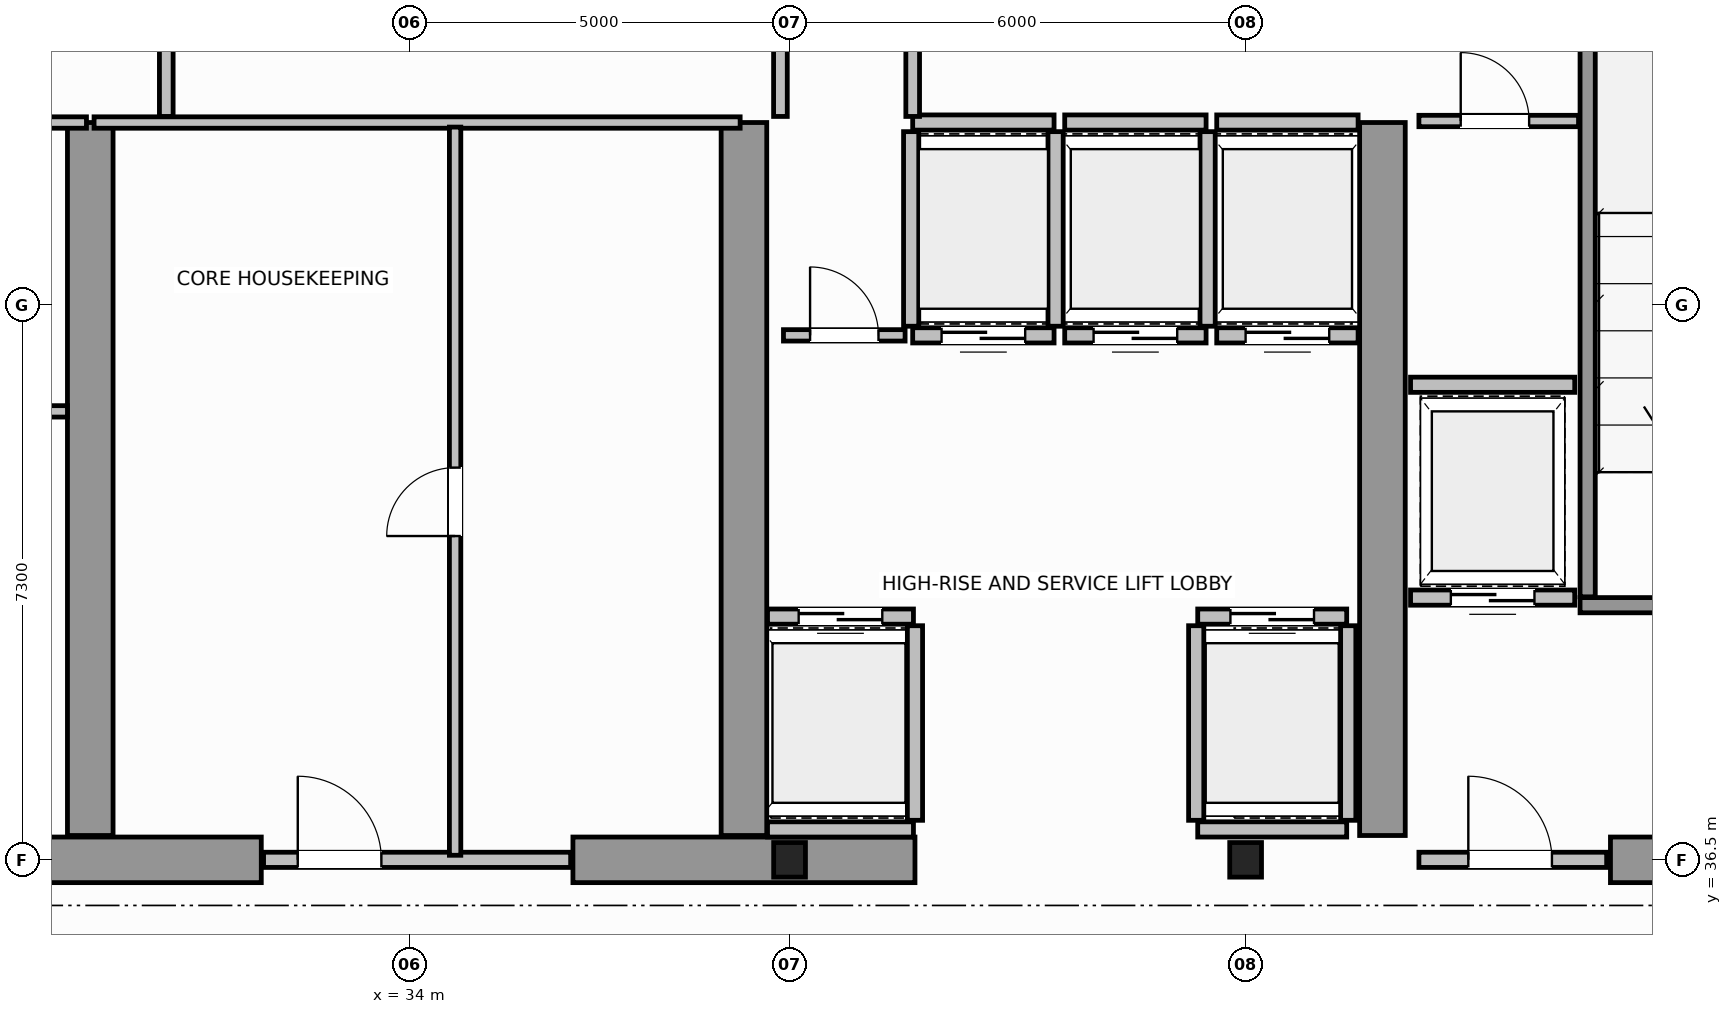
"""IFC4 building model, lengths in metres.
Left out: names, types, materials, properties, quantities, classifications, styles, units other than length and angle.
Written with IfcOpenShell. Run it as: python <this file> out.ifc"""

import sys

from ifc_helpers import new_model, si_unit, direction, frame, frame_2d, origin, origin_2d, place, context, subcontext, project, spatial, rectangle, i_section, extrude, source, transform, mapped, element, fill, save


model = new_model("IFC4")
c1 = context("Model", 3, precision=1e-05, world=origin(), true_north=direction((0.0, 1.0)))
c2 = subcontext(c1, "Body", "Model", "MODEL_VIEW")
j1 = project(units=[si_unit("LENGTHUNIT", "METRE"), si_unit("PLANEANGLEUNIT", "RADIAN")], contexts=[c1])
p1 = place(None, origin())
s1 = spatial("IfcSite", under=j1, at=p1, CompositionType="ELEMENT")
p2 = place(p1, origin())
s2 = spatial("IfcBuilding", under=s1, at=p2, CompositionType="ELEMENT")
p3 = place(p2, frame((0.0, 0.0, 214.6)))
s3 = spatial("IfcBuildingStorey", under=s2, at=p3, CompositionType="ELEMENT", Elevation=214.6)
m1 = source(origin(), c2, "Body", "SweptSolid", [
    extrude(i_section(OverallWidth=0.418, OverallDepth=0.455, WebThickness=0.042, FlangeThickness=0.058, FilletRadius=0.015, at=origin_2d()), origin(), (0.0, 0.0, 1.0), 3.8),
])
for number, where, z_axis, x_axis in (
    (1, (39.0, 36.5, 0.0), (0.0, 0.0, 1.0), (1.0, 0.0, 0.0)),
    (2, (45.0, 36.5, 0.0), (0.0, 0.0, 1.0), (1.0, 0.0, 0.0)),
):
    element("IfcColumn", number, at=place(p3, frame(where, z_axis=z_axis, x_axis=x_axis)), inside=s3, PredefinedType="COLUMN", context=c2, shape_type="MappedRepresentation", body=[
        mapped(m1, transform((0.0, 0.0, 0.0), scale=1.0)),
    ])
for number, where, z_axis, x_axis in (
    (3, (27.55, 36.5, 0.0), (0.0, 0.0, 1.0), (1.0, 0.0, 0.0)),
    (4, (36.15, 36.5, 0.0), (0.0, 0.0, 1.0), (1.0, 0.0, 0.0)),
):
    element("IfcWall", number, at=place(p3, frame(where, z_axis=z_axis, x_axis=x_axis)), inside=s3, PredefinedType="SHEAR", context=c2, shape_type="SweptSolid", body=[
        extrude(rectangle(XDim=4.5, YDim=0.6, at=frame_2d((2.25, 0.0))), origin(), (0.0, 0.0, 1.0), 3.8),
    ])
p4 = place(p3, frame((49.8, 36.5, 0.0), z_axis=(0.0, 0.0, 1.0), x_axis=(1.0, 0.0, 0.0)))
e5 = element("IfcWall", 5, at=p4, inside=s3, PredefinedType="SHEAR", context=c2, shape_type="SweptSolid", body=[
    extrude(rectangle(XDim=3.88, YDim=0.6, at=frame_2d((1.94, 0.0))), origin(), (0.0, 0.0, 1.0), 2.54),
])
for number, where, z_axis, x_axis in (
    (6, (29.8, 36.82, 0.0), (0.0, 0.0, 1.0), (0.0, 1.0, 0.0)),
    (7, (38.4, 36.82, 0.0), (0.0, 0.0, 1.0), (0.0, 1.0, 0.0)),
    (8, (46.8, 36.82, 0.0), (0.0, 0.0, 1.0), (0.0, 1.0, 0.0)),
):
    element("IfcWall", number, at=place(p3, frame(where, z_axis=z_axis, x_axis=x_axis)), inside=s3, PredefinedType="SHEAR", context=c2, shape_type="SweptSolid", body=[
        extrude(rectangle(XDim=9.38, YDim=0.6, at=frame_2d((4.69, 0.0))), origin(), (0.0, 0.0, 1.0), 3.8),
    ])
p5 = place(p3, frame((49.4, 39.85, 0.0), z_axis=(0.0, 0.0, 1.0), x_axis=(1.0, 0.0, 0.0)))
e9 = element("IfcWall", 9, at=p5, inside=s3, PredefinedType="SOLIDWALL", context=c2, shape_type="SweptSolid", body=[
    extrude(rectangle(XDim=4.3, YDim=0.2, at=frame_2d((2.15, 0.0))), origin(), (0.0, 0.0, 1.0), 3.8),
])
p6 = place(p5, frame((1.325, 0.0, 0.0)))
e10 = element("IfcOpeningElement", 10, at=p6, cuts=e9, PredefinedType="OPENING", context=c2, shape_type="SweptSolid", body=[
    extrude(rectangle(XDim=1.1, YDim=2.15, at=frame_2d((0.55, 1.075))), frame((0.0, 0.11, 0.0), z_axis=(0.0, -1.0, 0.0), x_axis=(1.0, 0.0, 0.0)), (0.0, 0.0, 1.0), 0.22),
])
p7 = place(p3, frame((49.5, 39.96, 0.0), z_axis=(0.0, 0.0, 1.0), x_axis=(0.0, 1.0, 0.0)))
e11 = element("IfcWall", 11, at=p7, inside=s3, PredefinedType="SOLIDWALL", context=c2, shape_type="SweptSolid", body=[
    extrude(rectangle(XDim=9.93, YDim=0.2, at=frame_2d((4.965, 0.0))), origin(), (0.0, 0.0, 1.0), 3.8),
])
p8 = place(p3, frame((47.28, 36.5, 0.0), z_axis=(0.0, 0.0, 1.0), x_axis=(1.0, 0.0, 0.0)))
e12 = element("IfcWall", 12, at=p8, inside=s3, PredefinedType="SOLIDWALL", context=c2, shape_type="SweptSolid", body=[
    extrude(rectangle(XDim=2.47, YDim=0.2, at=frame_2d((1.235, 0.0))), origin(), (0.0, 0.0, 1.0), 2.53),
])
p9 = place(p8, frame((0.65, 0.0, 0.0)))
e13 = element("IfcOpeningElement", 13, at=p9, cuts=e12, PredefinedType="OPENING", context=c2, shape_type="SweptSolid", body=[
    extrude(rectangle(XDim=1.1, YDim=2.15, at=frame_2d((0.55, 1.075))), frame((0.0, 0.11, 0.0), z_axis=(0.0, -1.0, 0.0), x_axis=(1.0, 0.0, 0.0)), (0.0, 0.0, 1.0), 0.22),
])
p10 = place(p3, frame((38.71, 39.7, 0.0), z_axis=(0.0, 0.0, 1.0), x_axis=(1.0, 0.0, 0.0)))
e14 = element("IfcWall", 14, at=p10, inside=s3, PredefinedType="SOLIDWALL", context=c2, shape_type="SweptSolid", body=[
    extrude(rectangle(XDim=1.92, YDim=0.2, at=frame_2d((0.96, 0.0))), origin(), (0.0, 0.0, 1.0), 3.54),
])
p11 = place(p10, frame((0.41, 0.0, 0.0)))
e15 = element("IfcOpeningElement", 15, at=p11, cuts=e14, PredefinedType="OPENING", context=c2, shape_type="SweptSolid", body=[
    extrude(rectangle(XDim=1.1, YDim=2.15, at=frame_2d((0.55, 1.075))), frame((0.0, 0.11, 0.0), z_axis=(0.0, -1.0, 0.0), x_axis=(1.0, 0.0, 0.0)), (0.0, 0.0, 1.0), 0.22),
])
p12 = place(p3, frame((38.71, 36.9, 0.0), z_axis=(0.0, 0.0, 1.0), x_axis=(1.0, 0.0, 0.0)))
e16 = element("IfcWall", 16, at=p12, inside=s3, PredefinedType="SOLIDWALL", context=c2, shape_type="SweptSolid", body=[
    extrude(rectangle(XDim=1.92, YDim=0.2, at=frame_2d((0.96, 0.0))), origin(), (0.0, 0.0, 1.0), 3.54),
])
p13 = place(p3, frame((40.65, 37.02, 0.0), z_axis=(0.0, 0.0, 1.0), x_axis=(0.0, 1.0, 0.0)))
e17 = element("IfcWall", 17, at=p13, inside=s3, PredefinedType="SOLIDWALL", context=c2, shape_type="SweptSolid", body=[
    extrude(rectangle(XDim=2.56, YDim=0.2, at=frame_2d((1.28, 0.0))), origin(), (0.0, 0.0, 1.0), 3.54),
])
p14 = place(p3, frame((44.37, 39.7, 0.0), z_axis=(0.0, 0.0, 1.0), x_axis=(1.0, 0.0, 0.0)))
e18 = element("IfcWall", 18, at=p14, inside=s3, PredefinedType="SOLIDWALL", context=c2, shape_type="SweptSolid", body=[
    extrude(rectangle(XDim=1.96, YDim=0.2, at=frame_2d((0.98, 0.0))), origin(), (0.0, 0.0, 1.0), 3.54),
])
p15 = place(p14, frame((0.43, 0.0, 0.0)))
e19 = element("IfcOpeningElement", 19, at=p15, cuts=e18, PredefinedType="OPENING", context=c2, shape_type="SweptSolid", body=[
    extrude(rectangle(XDim=1.1, YDim=2.15, at=frame_2d((0.55, 1.075))), frame((0.0, 0.11, 0.0), z_axis=(0.0, -1.0, 0.0), x_axis=(1.0, 0.0, 0.0)), (0.0, 0.0, 1.0), 0.22),
])
p16 = place(p3, frame((44.37, 36.9, 0.0), z_axis=(0.0, 0.0, 1.0), x_axis=(1.0, 0.0, 0.0)))
e20 = element("IfcWall", 20, at=p16, inside=s3, PredefinedType="SOLIDWALL", context=c2, shape_type="SweptSolid", body=[
    extrude(rectangle(XDim=1.96, YDim=0.2, at=frame_2d((0.98, 0.0))), origin(), (0.0, 0.0, 1.0), 2.53),
])
for number, where, z_axis, x_axis in (
    (21, (44.35, 37.02, 0.0), (0.0, 0.0, 1.0), (0.0, 1.0, 0.0)),
    (22, (46.35, 37.02, 0.0), (0.0, 0.0, 1.0), (0.0, 1.0, 0.0)),
):
    element("IfcWall", number, at=place(p3, frame(where, z_axis=z_axis, x_axis=x_axis)), inside=s3, PredefinedType="SOLIDWALL", context=c2, shape_type="SweptSolid", body=[
        extrude(rectangle(XDim=2.56, YDim=0.2, at=frame_2d((1.28, 0.0))), origin(), (0.0, 0.0, 1.0), 3.54),
    ])
p17 = place(p3, frame((40.62, 43.4, 0.0), z_axis=(0.0, 0.0, 1.0), x_axis=(1.0, 0.0, 0.0)))
e23 = element("IfcWall", 23, at=p17, inside=s3, PredefinedType="SOLIDWALL", context=c2, shape_type="SweptSolid", body=[
    extrude(rectangle(XDim=1.86, YDim=0.2, at=frame_2d((0.93, 0.0))), origin(), (0.0, 0.0, 1.0), 3.54),
])
p18 = place(p17, frame((0.38, 0.0, 0.0)))
e24 = element("IfcOpeningElement", 24, at=p18, cuts=e23, PredefinedType="OPENING", context=c2, shape_type="SweptSolid", body=[
    extrude(rectangle(XDim=1.1, YDim=2.15, at=frame_2d((0.55, 1.075))), frame((0.0, 0.11, 0.0), z_axis=(0.0, -1.0, 0.0), x_axis=(1.0, 0.0, 0.0)), (0.0, 0.0, 1.0), 0.22),
])
p19 = place(p3, frame((40.62, 46.2, 0.0), z_axis=(0.0, 0.0, 1.0), x_axis=(1.0, 0.0, 0.0)))
e25 = element("IfcWall", 25, at=p19, inside=s3, PredefinedType="SOLIDWALL", context=c2, shape_type="SweptSolid", body=[
    extrude(rectangle(XDim=1.86, YDim=0.2, at=frame_2d((0.93, 0.0))), origin(), (0.0, 0.0, 1.0), 3.54),
])
for number, where, z_axis, x_axis in (
    (26, (40.6, 43.52, 0.0), (0.0, 0.0, 1.0), (0.0, 1.0, 0.0)),
    (27, (42.5, 43.52, 0.0), (0.0, 0.0, 1.0), (0.0, 1.0, 0.0)),
):
    element("IfcWall", number, at=place(p3, frame(where, z_axis=z_axis, x_axis=x_axis)), inside=s3, PredefinedType="SOLIDWALL", context=c2, shape_type="SweptSolid", body=[
        extrude(rectangle(XDim=2.56, YDim=0.2, at=frame_2d((1.28, 0.0))), origin(), (0.0, 0.0, 1.0), 3.54),
    ])
p20 = place(p3, frame((42.62, 43.4, 0.0), z_axis=(0.0, 0.0, 1.0), x_axis=(1.0, 0.0, 0.0)))
e28 = element("IfcWall", 28, at=p20, inside=s3, PredefinedType="SOLIDWALL", context=c2, shape_type="SweptSolid", body=[
    extrude(rectangle(XDim=1.86, YDim=0.2, at=frame_2d((0.93, 0.0))), origin(), (0.0, 0.0, 1.0), 3.54),
])
p21 = place(p20, frame((0.38, 0.0, 0.0)))
e29 = element("IfcOpeningElement", 29, at=p21, cuts=e28, PredefinedType="OPENING", context=c2, shape_type="SweptSolid", body=[
    extrude(rectangle(XDim=1.1, YDim=2.15, at=frame_2d((0.55, 1.075))), frame((0.0, 0.11, 0.0), z_axis=(0.0, -1.0, 0.0), x_axis=(1.0, 0.0, 0.0)), (0.0, 0.0, 1.0), 0.22),
])
p22 = place(p3, frame((42.62, 46.2, 0.0), z_axis=(0.0, 0.0, 1.0), x_axis=(1.0, 0.0, 0.0)))
e30 = element("IfcWall", 30, at=p22, inside=s3, PredefinedType="SOLIDWALL", context=c2, shape_type="SweptSolid", body=[
    extrude(rectangle(XDim=1.86, YDim=0.2, at=frame_2d((0.93, 0.0))), origin(), (0.0, 0.0, 1.0), 3.54),
])
p23 = place(p3, frame((44.5, 43.52, 0.0), z_axis=(0.0, 0.0, 1.0), x_axis=(0.0, 1.0, 0.0)))
e31 = element("IfcWall", 31, at=p23, inside=s3, PredefinedType="SOLIDWALL", context=c2, shape_type="SweptSolid", body=[
    extrude(rectangle(XDim=2.56, YDim=0.2, at=frame_2d((1.28, 0.0))), origin(), (0.0, 0.0, 1.0), 3.54),
])
p24 = place(p3, frame((44.62, 43.4, 0.0), z_axis=(0.0, 0.0, 1.0), x_axis=(1.0, 0.0, 0.0)))
e32 = element("IfcWall", 32, at=p24, inside=s3, PredefinedType="SOLIDWALL", context=c2, shape_type="SweptSolid", body=[
    extrude(rectangle(XDim=1.86, YDim=0.2, at=frame_2d((0.93, 0.0))), origin(), (0.0, 0.0, 1.0), 3.54),
])
p25 = place(p24, frame((0.38, 0.0, 0.0)))
e33 = element("IfcOpeningElement", 33, at=p25, cuts=e32, PredefinedType="OPENING", context=c2, shape_type="SweptSolid", body=[
    extrude(rectangle(XDim=1.1, YDim=2.15, at=frame_2d((0.55, 1.075))), frame((0.0, 0.11, 0.0), z_axis=(0.0, -1.0, 0.0), x_axis=(1.0, 0.0, 0.0)), (0.0, 0.0, 1.0), 0.22),
])
p26 = place(p3, frame((44.62, 46.2, 0.0), z_axis=(0.0, 0.0, 1.0), x_axis=(1.0, 0.0, 0.0)))
e34 = element("IfcWall", 34, at=p26, inside=s3, PredefinedType="SOLIDWALL", context=c2, shape_type="SweptSolid", body=[
    extrude(rectangle(XDim=1.86, YDim=0.2, at=frame_2d((0.93, 0.0))), origin(), (0.0, 0.0, 1.0), 3.54),
])
p27 = place(p3, frame((47.17, 39.95, 0.0), z_axis=(0.0, 0.0, 1.0), x_axis=(1.0, 0.0, 0.0)))
e35 = element("IfcWall", 35, at=p27, inside=s3, PredefinedType="SOLIDWALL", context=c2, shape_type="SweptSolid", body=[
    extrude(rectangle(XDim=2.16, YDim=0.2, at=frame_2d((1.08, 0.0))), origin(), (0.0, 0.0, 1.0), 3.54),
])
p28 = place(p27, frame((0.53, 0.0, 0.0)))
e36 = element("IfcOpeningElement", 36, at=p28, cuts=e35, PredefinedType="OPENING", context=c2, shape_type="SweptSolid", body=[
    extrude(rectangle(XDim=1.1, YDim=2.15, at=frame_2d((0.55, 1.075))), frame((0.0, 0.11, 0.0), z_axis=(0.0, -1.0, 0.0), x_axis=(1.0, 0.0, 0.0)), (0.0, 0.0, 1.0), 0.22),
])
p29 = place(p3, frame((47.17, 42.75, 0.0), z_axis=(0.0, 0.0, 1.0), x_axis=(1.0, 0.0, 0.0)))
e37 = element("IfcWall", 37, at=p29, inside=s3, PredefinedType="SOLIDWALL", context=c2, shape_type="SweptSolid", body=[
    extrude(rectangle(XDim=2.16, YDim=0.2, at=frame_2d((1.08, 0.0))), origin(), (0.0, 0.0, 1.0), 3.54),
])
p30 = place(p3, frame((21.25, 46.2, 0.0), z_axis=(0.0, 0.0, 1.0), x_axis=(1.0, 0.0, 0.0)))
e38 = element("IfcWall", 38, at=p30, inside=s3, PredefinedType="PARTITIONING", context=c2, shape_type="SweptSolid", body=[
    extrude(rectangle(XDim=8.5, YDim=0.15, at=frame_2d((4.25, 0.0))), origin(), (0.0, 0.0, 1.0), 3.54),
])
p31 = place(p3, frame((21.5, 42.4, 0.0), z_axis=(0.0, 0.0, 1.0), x_axis=(1.0, 0.0, 0.0)))
e39 = element("IfcWall", 39, at=p31, inside=s3, PredefinedType="PARTITIONING", context=c2, shape_type="SweptSolid", body=[
    extrude(rectangle(XDim=8.0, YDim=0.15, at=frame_2d((4.0, 0.0))), origin(), (0.0, 0.0, 1.0), 3.54),
])
p32 = place(p31, frame((3.4, 0.0, 0.0)))
e40 = element("IfcOpeningElement", 40, at=p32, cuts=e39, PredefinedType="OPENING", context=c2, shape_type="SweptSolid", body=[
    extrude(rectangle(XDim=0.9, YDim=2.1, at=frame_2d((0.45, 1.05))), frame((0.0, 0.085, 0.0), z_axis=(0.0, -1.0, 0.0), x_axis=(1.0, 0.0, 0.0)), (0.0, 0.0, 1.0), 0.17),
])
p33 = place(p3, frame((32.08, 36.5, 0.0), z_axis=(0.0, 0.0, 1.0), x_axis=(1.0, 0.0, 0.0)))
e41 = element("IfcWall", 41, at=p33, inside=s3, PredefinedType="SOLIDWALL", context=c2, shape_type="SweptSolid", body=[
    extrude(rectangle(XDim=4.04, YDim=0.2, at=frame_2d((2.02, 0.0))), origin(), (0.0, 0.0, 1.0), 2.93),
])
p34 = place(p33, frame((0.45, 0.0, 0.0)))
e42 = element("IfcOpeningElement", 42, at=p34, cuts=e41, PredefinedType="OPENING", context=c2, shape_type="SweptSolid", body=[
    extrude(rectangle(XDim=1.1, YDim=2.15, at=frame_2d((0.55, 1.075))), frame((0.0, 0.11, 0.0), z_axis=(0.0, -1.0, 0.0), x_axis=(1.0, 0.0, 0.0)), (0.0, 0.0, 1.0), 0.22),
])
p35 = place(p3, frame((29.85, 46.2, 0.0), z_axis=(0.0, 0.0, 1.0), x_axis=(1.0, 0.0, 0.0)))
e43 = element("IfcWall", 43, at=p35, inside=s3, PredefinedType="PARTITIONING", context=c2, shape_type="SweptSolid", body=[
    extrude(rectangle(XDim=8.5, YDim=0.15, at=frame_2d((4.25, 0.0))), origin(), (0.0, 0.0, 1.0), 3.54),
])
p36 = place(p3, frame((34.6, 36.56, 0.0), z_axis=(0.0, 0.0, 1.0), x_axis=(0.0, 1.0, 0.0)))
e44 = element("IfcWall", 44, at=p36, inside=s3, PredefinedType="PARTITIONING", context=c2, shape_type="SweptSolid", body=[
    extrude(rectangle(XDim=9.58, YDim=0.15, at=frame_2d((4.79, 0.0))), origin(), (0.0, 0.0, 1.0), 3.54),
])
p37 = place(p36, frame((4.2, 0.0, 0.0)))
e45 = element("IfcOpeningElement", 45, at=p37, cuts=e44, PredefinedType="OPENING", context=c2, shape_type="SweptSolid", body=[
    extrude(rectangle(XDim=0.9, YDim=2.1, at=frame_2d((0.45, 1.05))), frame((0.0, 0.085, 0.0), z_axis=(0.0, -1.0, 0.0), x_axis=(1.0, 0.0, 0.0)), (0.0, 0.0, 1.0), 0.17),
])
p38 = place(p3, frame((47.28, 46.22, 0.0), z_axis=(0.0, 0.0, 1.0), x_axis=(1.0, 0.0, 0.0)))
e46 = element("IfcWall", 46, at=p38, inside=s3, PredefinedType="PARTITIONING", context=c2, shape_type="SweptSolid", body=[
    extrude(rectangle(XDim=2.1, YDim=0.15, at=frame_2d((1.05, 0.0))), origin(), (0.0, 0.0, 1.0), 3.54),
])
p39 = place(p38, frame((0.55, 0.0, 0.0)))
e47 = element("IfcOpeningElement", 47, at=p39, cuts=e46, PredefinedType="OPENING", context=c2, shape_type="SweptSolid", body=[
    extrude(rectangle(XDim=0.9, YDim=2.1, at=frame_2d((0.45, 1.05))), frame((0.0, 0.085, 0.0), z_axis=(0.0, -1.0, 0.0), x_axis=(1.0, 0.0, 0.0)), (0.0, 0.0, 1.0), 0.17),
])
p40 = place(p3, frame((38.92, 43.4, 0.0), z_axis=(0.0, 0.0, 1.0), x_axis=(1.0, 0.0, 0.0)))
e48 = element("IfcWall", 48, at=p40, inside=s3, PredefinedType="PARTITIONING", context=c2, shape_type="SweptSolid", body=[
    extrude(rectangle(XDim=1.6, YDim=0.15, at=frame_2d((0.8, 0.0))), origin(), (0.0, 0.0, 1.0), 3.54),
])
p41 = place(p40, frame((0.35, 0.0, 0.0)))
e49 = element("IfcOpeningElement", 49, at=p41, cuts=e48, PredefinedType="OPENING", context=c2, shape_type="SweptSolid", body=[
    extrude(rectangle(XDim=0.9, YDim=2.1, at=frame_2d((0.45, 1.05))), frame((0.0, 0.085, 0.0), z_axis=(0.0, -1.0, 0.0), x_axis=(1.0, 0.0, 0.0)), (0.0, 0.0, 1.0), 0.17),
])
for number, where, z_axis, x_axis in (
    (50, (30.8, 46.28, 0.0), (0.0, 0.0, 1.0), (0.0, 1.0, 0.0)),
    (51, (38.88, 46.28, 0.0), (0.0, 0.0, 1.0), (0.0, 1.0, 0.0)),
):
    element("IfcWall", number, at=place(p3, frame(where, z_axis=z_axis, x_axis=x_axis)), inside=s3, PredefinedType="PLUMBINGWALL", context=c2, shape_type="SweptSolid", body=[
        extrude(rectangle(XDim=1.94, YDim=0.18, at=frame_2d((0.97, 0.0))), origin(), (0.0, 0.0, 1.0), 3.54),
    ])
p42 = place(p3, frame((40.62, 46.28, 0.0), z_axis=(0.0, 0.0, 1.0), x_axis=(0.0, 1.0, 0.0)))
e52 = element("IfcWall", 52, at=p42, inside=s3, PredefinedType="PLUMBINGWALL", context=c2, shape_type="SweptSolid", body=[
    extrude(rectangle(XDim=2.0, YDim=0.18, at=frame_2d((1.0, 0.0))), origin(), (0.0, 0.0, 1.0), 3.54),
])
m2 = source(origin(), c2, "Body", "SweptSolid", [
    extrude(rectangle(XDim=1.1, YDim=2.15, at=frame_2d((0.55, 1.075))), frame((0.0, 0.025, 0.0), z_axis=(0.0, -1.0, 0.0), x_axis=(1.0, 0.0, 0.0)), (0.0, 0.0, 1.0), 0.05),
])
p43 = place(p9, origin())
e53 = element("IfcDoor", 53, at=p43, inside=s3, OperationType="SINGLE_SWING_LEFT", PredefinedType="DOOR", context=c2, shape_type="MappedRepresentation", body=[
    mapped(m2, transform((0.0, 0.0, 0.0), scale=1.0)),
])
fill(e13, e53)
p44 = place(p11, origin())
e54 = element("IfcDoor", 54, at=p44, inside=s3, OperationType="DOUBLE_DOOR_SLIDING", PredefinedType="DOOR", context=c2, shape_type="MappedRepresentation", body=[
    mapped(m2, transform((0.0, 0.0, 0.0), scale=1.0)),
])
fill(e15, e54)
p45 = place(p15, origin())
e55 = element("IfcDoor", 55, at=p45, inside=s3, OperationType="DOUBLE_DOOR_SLIDING", PredefinedType="DOOR", context=c2, shape_type="MappedRepresentation", body=[
    mapped(m2, transform((0.0, 0.0, 0.0), scale=1.0)),
])
fill(e19, e55)
p46 = place(p18, origin())
e56 = element("IfcDoor", 56, at=p46, inside=s3, OperationType="DOUBLE_DOOR_SLIDING", PredefinedType="DOOR", context=c2, shape_type="MappedRepresentation", body=[
    mapped(m2, transform((0.0, 0.0, 0.0), scale=1.0)),
])
fill(e24, e56)
p47 = place(p21, origin())
e57 = element("IfcDoor", 57, at=p47, inside=s3, OperationType="DOUBLE_DOOR_SLIDING", PredefinedType="DOOR", context=c2, shape_type="MappedRepresentation", body=[
    mapped(m2, transform((0.0, 0.0, 0.0), scale=1.0)),
])
fill(e29, e57)
p48 = place(p25, origin())
e58 = element("IfcDoor", 58, at=p48, inside=s3, OperationType="DOUBLE_DOOR_SLIDING", PredefinedType="DOOR", context=c2, shape_type="MappedRepresentation", body=[
    mapped(m2, transform((0.0, 0.0, 0.0), scale=1.0)),
])
fill(e33, e58)
p49 = place(p28, origin())
e59 = element("IfcDoor", 59, at=p49, inside=s3, OperationType="DOUBLE_DOOR_SLIDING", PredefinedType="DOOR", context=c2, shape_type="MappedRepresentation", body=[
    mapped(m2, transform((0.0, 0.0, 0.0), scale=1.0)),
])
fill(e36, e59)
p50 = place(p34, origin())
e60 = element("IfcDoor", 60, at=p50, inside=s3, OperationType="SINGLE_SWING_LEFT", PredefinedType="DOOR", context=c2, shape_type="MappedRepresentation", body=[
    mapped(m2, transform((0.0, 0.0, 0.0), scale=1.0)),
])
fill(e42, e60)
m3 = source(origin(), c2, "Body", "SweptSolid", [
    extrude(rectangle(XDim=0.9, YDim=2.1, at=frame_2d((0.45, 1.05))), frame((0.0, 0.025, 0.0), z_axis=(0.0, -1.0, 0.0), x_axis=(1.0, 0.0, 0.0)), (0.0, 0.0, 1.0), 0.05),
])
p51 = place(p37, origin())
e61 = element("IfcDoor", 61, at=p51, inside=s3, OperationType="SINGLE_SWING_RIGHT", PredefinedType="DOOR", context=c2, shape_type="MappedRepresentation", body=[
    mapped(m3, transform((0.0, 0.0, 0.0), scale=1.0)),
])
fill(e45, e61)
p52 = place(p39, origin())
e62 = element("IfcDoor", 62, at=p52, inside=s3, OperationType="SINGLE_SWING_RIGHT", PredefinedType="DOOR", context=c2, shape_type="MappedRepresentation", body=[
    mapped(m3, transform((0.0, 0.0, 0.0), scale=1.0)),
])
fill(e47, e62)
p53 = place(p41, origin())
e63 = element("IfcDoor", 63, at=p53, inside=s3, OperationType="SINGLE_SWING_LEFT", PredefinedType="DOOR", context=c2, shape_type="MappedRepresentation", body=[
    mapped(m3, transform((0.0, 0.0, 0.0), scale=1.0)),
])
fill(e49, e63)
save(model, sys.argv[1])
